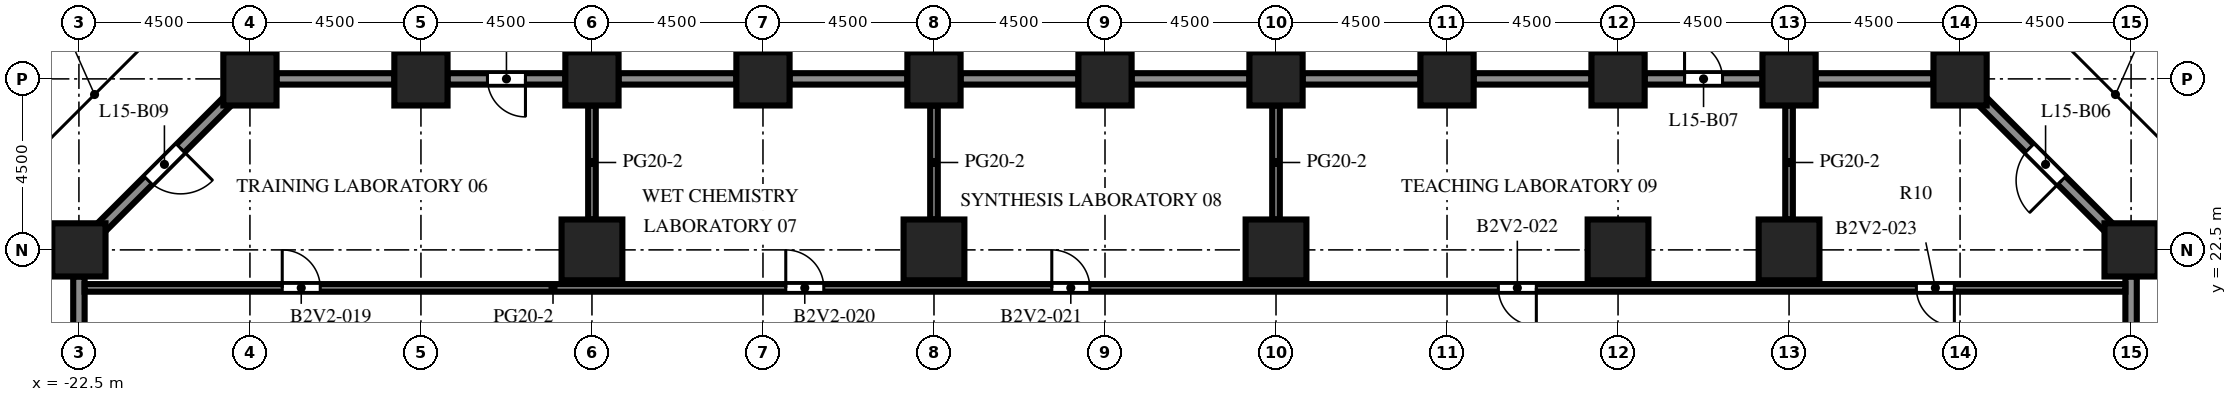
"""IFC4 building model, lengths in metres.
Left out: names, types, materials, properties, quantities, classifications, styles, units other than length and angle.
Written with IfcOpenShell. Run it as: python <this file> out.ifc"""

import sys

from ifc_helpers import new_model, si_unit, direction, frame, frame_2d, origin, origin_2d, place, context, subcontext, project, spatial, rectangle, extrude, element, fill, save


model = new_model("IFC4")
c1 = context("Model", 3, precision=1e-05, world=origin(), true_north=direction((0.0, 1.0)))
c2 = subcontext(c1, "Body", "Model", "MODEL_VIEW")
j1 = project(units=[si_unit("LENGTHUNIT", "METRE"), si_unit("PLANEANGLEUNIT", "RADIAN")], contexts=[c1])
p1 = place(None, origin())
s1 = spatial("IfcSite", under=j1, at=p1, CompositionType="ELEMENT")
p2 = place(p1, origin())
s2 = spatial("IfcBuilding", under=s1, at=p2, CompositionType="ELEMENT")
p3 = place(p2, frame((0.0, 0.0, 66.5)))
s3 = spatial("IfcBuildingStorey", under=s2, at=p3, CompositionType="ELEMENT", Elevation=66.5)
for number, where, z_axis, x_axis in (
    (1, (-22.5, 22.5, 0.0), (0.0, 0.0, 1.0), (1.0, 0.0, 0.0)),
    (2, (-18.0, 27.0, 0.0), (0.0, 0.0, 1.0), (1.0, 0.0, 0.0)),
    (3, (-13.5, 27.0, 0.0), (0.0, 0.0, 1.0), (1.0, 0.0, 0.0)),
    (4, (-9.0, 27.0, 0.0), (0.0, 0.0, 1.0), (1.0, 0.0, 0.0)),
    (5, (-4.5, 27.0, 0.0), (0.0, 0.0, 1.0), (1.0, 0.0, 0.0)),
    (6, (0.0, 27.0, 0.0), (0.0, 0.0, 1.0), (1.0, 0.0, 0.0)),
    (7, (4.5, 27.0, 0.0), (0.0, 0.0, 1.0), (1.0, 0.0, 0.0)),
    (8, (9.0, 27.0, 0.0), (0.0, 0.0, 1.0), (1.0, 0.0, 0.0)),
    (9, (13.5, 27.0, 0.0), (0.0, 0.0, 1.0), (1.0, 0.0, 0.0)),
    (10, (18.0, 27.0, 0.0), (0.0, 0.0, 1.0), (1.0, 0.0, 0.0)),
    (11, (22.5, 27.0, 0.0), (0.0, 0.0, 1.0), (1.0, 0.0, 0.0)),
    (12, (27.0, 27.0, 0.0), (0.0, 0.0, 1.0), (1.0, 0.0, 0.0)),
    (13, (31.5, 22.5, 0.0), (0.0, 0.0, 1.0), (1.0, 0.0, 0.0)),
):
    element("IfcColumn", number, at=place(p3, frame(where, z_axis=z_axis, x_axis=x_axis)), inside=s3, PredefinedType="COLUMN", context=c2, shape_type="SweptSolid", body=[
        extrude(rectangle(XDim=1.4, YDim=1.4, at=origin_2d()), origin(), (0.0, 0.0, 1.0), 4.1),
    ])
for number, where, z_axis, x_axis in (
    (14, (-9.0, 22.5, 0.0), (0.0, 0.0, 1.0), (1.0, 0.0, 0.0)),
    (15, (0.0, 22.5, 0.0), (0.0, 0.0, 1.0), (1.0, 0.0, 0.0)),
    (16, (9.0, 22.5, 0.0), (0.0, 0.0, 1.0), (1.0, 0.0, 0.0)),
    (17, (18.0, 22.5, 0.0), (0.0, 0.0, 1.0), (1.0, 0.0, 0.0)),
    (18, (22.5, 22.5, 0.0), (0.0, 0.0, 1.0), (1.0, 0.0, 0.0)),
):
    element("IfcColumn", number, at=place(p3, frame(where, z_axis=z_axis, x_axis=x_axis)), inside=s3, PredefinedType="COLUMN", context=c2, shape_type="SweptSolid", body=[
        extrude(rectangle(XDim=1.6, YDim=1.6, at=origin_2d()), origin(), (0.0, 0.0, 1.0), 4.1),
    ])
p4 = place(p3, frame((31.5, 21.8, 0.0), z_axis=(0.0, 0.0, 1.0), x_axis=(0.0, -1.0, 0.0)))
e19 = element("IfcWall", 19, at=p4, inside=s3, PredefinedType="SOLIDWALL", context=c2, shape_type="SweptSolid", body=[
    extrude(rectangle(XDim=3.1, YDim=0.3, at=frame_2d((1.55, 0.0))), origin(), (0.0, 0.0, 1.0), 2.6),
])
p5 = place(p3, frame((27.594, 26.406, 0.0), z_axis=(0.0, 0.0, 1.0), x_axis=(0.707106781187, -0.707106781187, 0.0)))
e20 = element("IfcWall", 20, at=p5, inside=s3, PredefinedType="SOLIDWALL", context=c2, shape_type="SweptSolid", body=[
    extrude(rectangle(XDim=4.684, YDim=0.3, at=frame_2d((2.342, 0.0))), origin(), (0.0, 0.0, 1.0), 2.6),
])
p6 = place(p5, frame((1.742, 0.0, 0.0)))
e21 = element("IfcOpeningElement", 21, at=p6, cuts=e20, PredefinedType="OPENING", context=c2, shape_type="SweptSolid", body=[
    extrude(rectangle(XDim=1.2, YDim=2.2, at=frame_2d((0.6, 1.1))), frame((0.0, 0.16, 0.0), z_axis=(0.0, -1.0, 0.0), x_axis=(1.0, 0.0, 0.0)), (0.0, 0.0, 1.0), 0.32),
])
p7 = place(p3, frame((23.2, 27.0, 0.0), z_axis=(0.0, 0.0, 1.0), x_axis=(1.0, 0.0, 0.0)))
e22 = element("IfcWall", 22, at=p7, inside=s3, PredefinedType="SOLIDWALL", context=c2, shape_type="SweptSolid", body=[
    extrude(rectangle(XDim=3.1, YDim=0.3, at=frame_2d((1.55, 0.0))), origin(), (0.0, 0.0, 1.0), 2.6),
])
p8 = place(p3, frame((18.7, 27.0, 0.0), z_axis=(0.0, 0.0, 1.0), x_axis=(1.0, 0.0, 0.0)))
e23 = element("IfcWall", 23, at=p8, inside=s3, PredefinedType="SOLIDWALL", context=c2, shape_type="SweptSolid", body=[
    extrude(rectangle(XDim=3.1, YDim=0.3, at=frame_2d((1.55, 0.0))), origin(), (0.0, 0.0, 1.0), 2.6),
])
p9 = place(p8, frame((1.05, 0.0, 0.0)))
e24 = element("IfcOpeningElement", 24, at=p9, cuts=e23, PredefinedType="OPENING", context=c2, shape_type="SweptSolid", body=[
    extrude(rectangle(XDim=1.0, YDim=2.2, at=frame_2d((0.5, 1.1))), frame((0.0, 0.16, 0.0), z_axis=(0.0, -1.0, 0.0), x_axis=(1.0, 0.0, 0.0)), (0.0, 0.0, 1.0), 0.32),
])
for number, where, z_axis, x_axis in (
    (25, (14.2, 27.0, 0.0), (0.0, 0.0, 1.0), (1.0, 0.0, 0.0)),
    (26, (9.7, 27.0, 0.0), (0.0, 0.0, 1.0), (1.0, 0.0, 0.0)),
    (27, (5.2, 27.0, 0.0), (0.0, 0.0, 1.0), (1.0, 0.0, 0.0)),
    (28, (0.7, 27.0, 0.0), (0.0, 0.0, 1.0), (1.0, 0.0, 0.0)),
    (29, (-3.8, 27.0, 0.0), (0.0, 0.0, 1.0), (1.0, 0.0, 0.0)),
    (30, (-8.3, 27.0, 0.0), (0.0, 0.0, 1.0), (1.0, 0.0, 0.0)),
):
    element("IfcWall", number, at=place(p3, frame(where, z_axis=z_axis, x_axis=x_axis)), inside=s3, PredefinedType="SOLIDWALL", context=c2, shape_type="SweptSolid", body=[
        extrude(rectangle(XDim=3.1, YDim=0.3, at=frame_2d((1.55, 0.0))), origin(), (0.0, 0.0, 1.0), 2.6),
    ])
p10 = place(p3, frame((-12.8, 27.0, 0.0), z_axis=(0.0, 0.0, 1.0), x_axis=(1.0, 0.0, 0.0)))
e31 = element("IfcWall", 31, at=p10, inside=s3, PredefinedType="SOLIDWALL", context=c2, shape_type="SweptSolid", body=[
    extrude(rectangle(XDim=3.1, YDim=0.3, at=frame_2d((1.55, 0.0))), origin(), (0.0, 0.0, 1.0), 2.6),
])
p11 = place(p10, frame((1.05, 0.0, 0.0)))
e32 = element("IfcOpeningElement", 32, at=p11, cuts=e31, PredefinedType="OPENING", context=c2, shape_type="SweptSolid", body=[
    extrude(rectangle(XDim=1.0, YDim=2.2, at=frame_2d((0.5, 1.1))), frame((0.0, 0.16, 0.0), z_axis=(0.0, -1.0, 0.0), x_axis=(1.0, 0.0, 0.0)), (0.0, 0.0, 1.0), 0.32),
])
p12 = place(p3, frame((-17.3, 27.0, 0.0), z_axis=(0.0, 0.0, 1.0), x_axis=(1.0, 0.0, 0.0)))
e33 = element("IfcWall", 33, at=p12, inside=s3, PredefinedType="SOLIDWALL", context=c2, shape_type="SweptSolid", body=[
    extrude(rectangle(XDim=3.1, YDim=0.3, at=frame_2d((1.55, 0.0))), origin(), (0.0, 0.0, 1.0), 2.6),
])
p13 = place(p3, frame((-21.906, 23.094, 0.0), z_axis=(0.0, 0.0, 1.0), x_axis=(0.707106781187, 0.707106781187, 0.0)))
e34 = element("IfcWall", 34, at=p13, inside=s3, PredefinedType="SOLIDWALL", context=c2, shape_type="SweptSolid", body=[
    extrude(rectangle(XDim=4.684, YDim=0.3, at=frame_2d((2.342, 0.0))), origin(), (0.0, 0.0, 1.0), 2.6),
])
p14 = place(p13, frame((1.742, 0.0, 0.0)))
e35 = element("IfcOpeningElement", 35, at=p14, cuts=e34, PredefinedType="OPENING", context=c2, shape_type="SweptSolid", body=[
    extrude(rectangle(XDim=1.2, YDim=2.2, at=frame_2d((0.6, 1.1))), frame((0.0, 0.16, 0.0), z_axis=(0.0, -1.0, 0.0), x_axis=(1.0, 0.0, 0.0)), (0.0, 0.0, 1.0), 0.32),
])
p15 = place(p3, frame((-22.5, 18.7, 0.0), z_axis=(0.0, 0.0, 1.0), x_axis=(0.0, 1.0, 0.0)))
e36 = element("IfcWall", 36, at=p15, inside=s3, PredefinedType="SOLIDWALL", context=c2, shape_type="SweptSolid", body=[
    extrude(rectangle(XDim=3.1, YDim=0.3, at=frame_2d((1.55, 0.0))), origin(), (0.0, 0.0, 1.0), 2.6),
])
for number, where, z_axis, x_axis in (
    (37, (-9.0, 23.3, 0.0), (0.0, 0.0, 1.0), (0.0, 1.0, 0.0)),
    (38, (0.0, 23.3, 0.0), (0.0, 0.0, 1.0), (0.0, 1.0, 0.0)),
    (39, (9.0, 23.3, 0.0), (0.0, 0.0, 1.0), (0.0, 1.0, 0.0)),
    (40, (22.5, 23.3, 0.0), (0.0, 0.0, 1.0), (0.0, 1.0, 0.0)),
):
    element("IfcWall", number, at=place(p3, frame(where, z_axis=z_axis, x_axis=x_axis)), inside=s3, PredefinedType="PARTITIONING", context=c2, shape_type="SweptSolid", body=[
        extrude(rectangle(XDim=3.0, YDim=0.2, at=frame_2d((1.5, 0.0))), origin(), (0.0, 0.0, 1.0), 3.5),
    ])
p16 = place(p3, frame((-22.35, 21.5, 0.0), z_axis=(0.0, 0.0, 1.0), x_axis=(1.0, 0.0, 0.0)))
e41 = element("IfcWall", 41, at=p16, inside=s3, PredefinedType="PARTITIONING", context=c2, shape_type="SweptSolid", body=[
    extrude(rectangle(XDim=53.7, YDim=0.2, at=frame_2d((26.85, 0.0))), origin(), (0.0, 0.0, 1.0), 3.5),
])
p17 = place(p16, frame((5.2, 0.0, 0.0)))
e42 = element("IfcOpeningElement", 42, at=p17, cuts=e41, PredefinedType="OPENING", context=c2, shape_type="SweptSolid", body=[
    extrude(rectangle(XDim=1.0, YDim=2.1, at=frame_2d((0.5, 1.05))), frame((0.0, 0.11, 0.0), z_axis=(0.0, -1.0, 0.0), x_axis=(1.0, 0.0, 0.0)), (0.0, 0.0, 1.0), 0.22),
])
p18 = place(p16, frame((18.45, 0.0, 0.0)))
e43 = element("IfcOpeningElement", 43, at=p18, cuts=e41, PredefinedType="OPENING", context=c2, shape_type="SweptSolid", body=[
    extrude(rectangle(XDim=1.0, YDim=2.1, at=frame_2d((0.5, 1.05))), frame((0.0, 0.11, 0.0), z_axis=(0.0, -1.0, 0.0), x_axis=(1.0, 0.0, 0.0)), (0.0, 0.0, 1.0), 0.22),
])
p19 = place(p16, frame((25.45, 0.0, 0.0)))
e44 = element("IfcOpeningElement", 44, at=p19, cuts=e41, PredefinedType="OPENING", context=c2, shape_type="SweptSolid", body=[
    extrude(rectangle(XDim=1.0, YDim=2.1, at=frame_2d((0.5, 1.05))), frame((0.0, 0.11, 0.0), z_axis=(0.0, -1.0, 0.0), x_axis=(1.0, 0.0, 0.0)), (0.0, 0.0, 1.0), 0.22),
])
p20 = place(p16, frame((37.2, 0.0, 0.0)))
e45 = element("IfcOpeningElement", 45, at=p20, cuts=e41, PredefinedType="OPENING", context=c2, shape_type="SweptSolid", body=[
    extrude(rectangle(XDim=1.0, YDim=2.1, at=frame_2d((0.5, 1.05))), frame((0.0, 0.11, 0.0), z_axis=(0.0, -1.0, 0.0), x_axis=(1.0, 0.0, 0.0)), (0.0, 0.0, 1.0), 0.22),
])
p21 = place(p16, frame((48.2, 0.0, 0.0)))
e46 = element("IfcOpeningElement", 46, at=p21, cuts=e41, PredefinedType="OPENING", context=c2, shape_type="SweptSolid", body=[
    extrude(rectangle(XDim=1.0, YDim=2.1, at=frame_2d((0.5, 1.05))), frame((0.0, 0.11, 0.0), z_axis=(0.0, -1.0, 0.0), x_axis=(1.0, 0.0, 0.0)), (0.0, 0.0, 1.0), 0.22),
])
p22 = place(p6, origin())
e47 = element("IfcDoor", 47, at=p22, inside=s3, OperationType="SINGLE_SWING_RIGHT", PredefinedType="DOOR", context=c2, shape_type="SweptSolid", body=[
    extrude(rectangle(XDim=1.2, YDim=2.2, at=frame_2d((0.6, 1.1))), frame((0.0, 0.025, 0.0), z_axis=(0.0, -1.0, 0.0), x_axis=(1.0, 0.0, 0.0)), (0.0, 0.0, 1.0), 0.05),
])
fill(e21, e47)
p23 = place(p9, origin())
e48 = element("IfcDoor", 48, at=p23, inside=s3, OperationType="SINGLE_SWING_LEFT", PredefinedType="DOOR", context=c2, shape_type="SweptSolid", body=[
    extrude(rectangle(XDim=1.0, YDim=2.2, at=frame_2d((0.5, 1.1))), frame((0.0, 0.025, 0.0), z_axis=(0.0, -1.0, 0.0), x_axis=(1.0, 0.0, 0.0)), (0.0, 0.0, 1.0), 0.05),
])
fill(e24, e48)
p24 = place(p11, origin())
e49 = element("IfcDoor", 49, at=p24, inside=s3, OperationType="SINGLE_SWING_RIGHT", PredefinedType="DOOR", context=c2, shape_type="SweptSolid", body=[
    extrude(rectangle(XDim=1.0, YDim=2.2, at=frame_2d((0.5, 1.1))), frame((0.0, 0.025, 0.0), z_axis=(0.0, -1.0, 0.0), x_axis=(1.0, 0.0, 0.0)), (0.0, 0.0, 1.0), 0.05),
])
fill(e32, e49)
p25 = place(p14, origin())
e50 = element("IfcDoor", 50, at=p25, inside=s3, OperationType="SINGLE_SWING_RIGHT", PredefinedType="DOOR", context=c2, shape_type="SweptSolid", body=[
    extrude(rectangle(XDim=1.2, YDim=2.2, at=frame_2d((0.6, 1.1))), frame((0.0, 0.025, 0.0), z_axis=(0.0, -1.0, 0.0), x_axis=(1.0, 0.0, 0.0)), (0.0, 0.0, 1.0), 0.05),
])
fill(e35, e50)
p26 = place(p17, origin())
e51 = element("IfcDoor", 51, at=p26, inside=s3, OperationType="SINGLE_SWING_LEFT", PredefinedType="DOOR", context=c2, shape_type="SweptSolid", body=[
    extrude(rectangle(XDim=1.0, YDim=2.1, at=frame_2d((0.5, 1.05))), frame((0.0, 0.025, 0.0), z_axis=(0.0, -1.0, 0.0), x_axis=(1.0, 0.0, 0.0)), (0.0, 0.0, 1.0), 0.05),
])
fill(e42, e51)
p27 = place(p18, origin())
e52 = element("IfcDoor", 52, at=p27, inside=s3, OperationType="SINGLE_SWING_LEFT", PredefinedType="DOOR", context=c2, shape_type="SweptSolid", body=[
    extrude(rectangle(XDim=1.0, YDim=2.1, at=frame_2d((0.5, 1.05))), frame((0.0, 0.025, 0.0), z_axis=(0.0, -1.0, 0.0), x_axis=(1.0, 0.0, 0.0)), (0.0, 0.0, 1.0), 0.05),
])
fill(e43, e52)
p28 = place(p19, origin())
e53 = element("IfcDoor", 53, at=p28, inside=s3, OperationType="SINGLE_SWING_LEFT", PredefinedType="DOOR", context=c2, shape_type="SweptSolid", body=[
    extrude(rectangle(XDim=1.0, YDim=2.1, at=frame_2d((0.5, 1.05))), frame((0.0, 0.025, 0.0), z_axis=(0.0, -1.0, 0.0), x_axis=(1.0, 0.0, 0.0)), (0.0, 0.0, 1.0), 0.05),
])
fill(e44, e53)
p29 = place(p20, origin())
e54 = element("IfcDoor", 54, at=p29, inside=s3, OperationType="SINGLE_SWING_RIGHT", PredefinedType="DOOR", context=c2, shape_type="SweptSolid", body=[
    extrude(rectangle(XDim=1.0, YDim=2.1, at=frame_2d((0.5, 1.05))), frame((0.0, 0.025, 0.0), z_axis=(0.0, -1.0, 0.0), x_axis=(1.0, 0.0, 0.0)), (0.0, 0.0, 1.0), 0.05),
])
fill(e45, e54)
p30 = place(p21, origin())
e55 = element("IfcDoor", 55, at=p30, inside=s3, OperationType="SINGLE_SWING_RIGHT", PredefinedType="DOOR", context=c2, shape_type="SweptSolid", body=[
    extrude(rectangle(XDim=1.0, YDim=2.1, at=frame_2d((0.5, 1.05))), frame((0.0, 0.025, 0.0), z_axis=(0.0, -1.0, 0.0), x_axis=(1.0, 0.0, 0.0)), (0.0, 0.0, 1.0), 0.05),
])
fill(e46, e55)
save(model, sys.argv[1])
